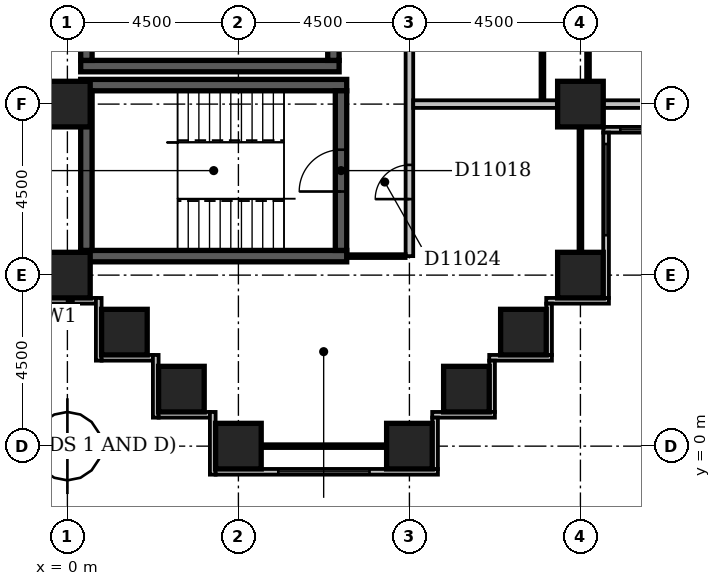
"""IFC4 building model, lengths in metres.
Left out: names, types, materials, properties, quantities, classifications, styles, units other than length and angle.
Written with IfcOpenShell. Run it as: python <this file> out.ifc"""

import sys

from ifc_helpers import new_model, si_unit, direction, frame, frame_2d, origin, origin_2d, place, context, subcontext, project, spatial, rectangle, extrude, element, fill, save


model = new_model("IFC4")
c1 = context("Model", 3, precision=1e-05, world=origin(), true_north=direction((0.0, 1.0)))
c2 = subcontext(c1, "Body", "Model", "MODEL_VIEW")
j1 = project(units=[si_unit("LENGTHUNIT", "METRE"), si_unit("PLANEANGLEUNIT", "RADIAN")], contexts=[c1])
p1 = place(None, origin())
s1 = spatial("IfcSite", under=j1, at=p1, CompositionType="ELEMENT")
p2 = place(p1, origin())
s2 = spatial("IfcBuilding", under=s1, at=p2, CompositionType="ELEMENT")
p3 = place(p2, frame((0.0, 0.0, 50.6)))
s3 = spatial("IfcBuildingStorey", under=s2, at=p3, CompositionType="ELEMENT", Elevation=50.6)
for number, where, z_axis, x_axis in (
    (1, (0.35, 5.0, -0.3), (0.0, 0.0, 1.0), (1.0, 0.0, 0.0)),
    (2, (0.35, 9.5, -0.3), (0.0, 0.0, 1.0), (1.0, 0.0, 0.0)),
):
    element("IfcWall", number, at=place(p3, frame(where, z_axis=z_axis, x_axis=x_axis)), inside=s3, PredefinedType="SHEAR", context=c2, shape_type="SweptSolid", body=[
        extrude(rectangle(XDim=7.0, YDim=0.3, at=frame_2d((3.5, 0.0))), origin(), (0.0, 0.0, 1.0), 3.6),
    ])
p4 = place(p3, frame((0.35, 10.0, -0.3), z_axis=(0.0, 0.0, 1.0), x_axis=(1.0, 0.0, 0.0)))
e3 = element("IfcWall", 3, at=p4, inside=s3, PredefinedType="SHEAR", context=c2, shape_type="SweptSolid", body=[
    extrude(rectangle(XDim=6.8, YDim=0.3, at=frame_2d((3.4, 0.0))), origin(), (0.0, 0.0, 1.0), 3.6),
])
p5 = place(p3, frame((0.5, 5.15, -0.3), z_axis=(0.0, 0.0, 1.0), x_axis=(0.0, 1.0, 0.0)))
e4 = element("IfcWall", 4, at=p5, inside=s3, PredefinedType="SHEAR", context=c2, shape_type="SweptSolid", body=[
    extrude(rectangle(XDim=4.2, YDim=0.3, at=frame_2d((2.1, 0.0))), origin(), (0.0, 0.0, 1.0), 3.6),
])
p6 = place(p3, frame((0.5, 10.15, -0.3), z_axis=(0.0, 0.0, 1.0), x_axis=(0.0, 1.0, 0.0)))
e5 = element("IfcWall", 5, at=p6, inside=s3, PredefinedType="SHEAR", context=c2, shape_type="SweptSolid", body=[
    extrude(rectangle(XDim=3.7, YDim=0.3, at=frame_2d((1.85, 0.0))), origin(), (0.0, 0.0, 1.0), 3.6),
])
p7 = place(p3, frame((7.0, 10.15, -0.3), z_axis=(0.0, 0.0, 1.0), x_axis=(0.0, 1.0, 0.0)))
e6 = element("IfcWall", 6, at=p7, inside=s3, PredefinedType="SHEAR", context=c2, shape_type="SweptSolid", body=[
    extrude(rectangle(XDim=3.7, YDim=0.3, at=frame_2d((1.85, 0.0))), origin(), (0.0, 0.0, 1.0), 3.6),
])
p8 = place(p7, frame((1.35, 0.0, 0.3)))
e7 = element("IfcOpeningElement", 7, at=p8, cuts=e6, PredefinedType="OPENING", context=c2, shape_type="SweptSolid", body=[
    extrude(rectangle(XDim=1.0, YDim=2.1, at=frame_2d((0.5, 1.05))), frame((0.0, 0.162, 0.0), z_axis=(0.0, -1.0, 0.0), x_axis=(1.0, 0.0, 0.0)), (0.0, 0.0, 1.0), 0.324),
])
p9 = place(p3, frame((7.2, 5.15, -0.3), z_axis=(0.0, 0.0, 1.0), x_axis=(0.0, 1.0, 0.0)))
e8 = element("IfcWall", 8, at=p9, inside=s3, PredefinedType="SHEAR", context=c2, shape_type="SweptSolid", body=[
    extrude(rectangle(XDim=4.2, YDim=0.3, at=frame_2d((2.1, 0.0))), origin(), (0.0, 0.0, 1.0), 3.6),
])
p10 = place(p9, frame((1.55, 0.0, 0.3)))
e9 = element("IfcOpeningElement", 9, at=p10, cuts=e8, PredefinedType="OPENING", context=c2, shape_type="SweptSolid", body=[
    extrude(rectangle(XDim=1.1, YDim=2.1, at=frame_2d((0.55, 1.05))), frame((0.0, 0.162, 0.0), z_axis=(0.0, -1.0, 0.0), x_axis=(1.0, 0.0, 0.0)), (0.0, 0.0, 1.0), 0.324),
])
for number, where, z_axis, x_axis in (
    (10, (4.5, 0.0, -0.3), (0.0, 0.0, 1.0), (1.0, 0.0, 0.0)),
    (11, (9.0, 0.0, -0.3), (0.0, 0.0, 1.0), (1.0, 0.0, 0.0)),
    (12, (3.0, 1.5, -0.3), (0.0, 0.0, 1.0), (1.0, 0.0, 0.0)),
    (13, (10.5, 1.5, -0.3), (0.0, 0.0, 1.0), (1.0, 0.0, 0.0)),
    (14, (1.5, 3.0, -0.3), (0.0, 0.0, 1.0), (1.0, 0.0, 0.0)),
    (15, (12.0, 3.0, -0.3), (0.0, 0.0, 1.0), (1.0, 0.0, 0.0)),
    (16, (0.0, 4.5, -0.3), (0.0, 0.0, 1.0), (1.0, 0.0, 0.0)),
    (17, (13.5, 4.5, -0.3), (0.0, 0.0, 1.0), (1.0, 0.0, 0.0)),
    (18, (0.0, 9.0, -0.3), (0.0, 0.0, 1.0), (1.0, 0.0, 0.0)),
    (19, (13.5, 9.0, -0.3), (0.0, 0.0, 1.0), (1.0, 0.0, 0.0)),
):
    element("IfcColumn", number, at=place(p3, frame(where, z_axis=z_axis, x_axis=x_axis)), inside=s3, PredefinedType="COLUMN", context=c2, shape_type="SweptSolid", body=[
        extrude(rectangle(XDim=1.2, YDim=1.2, at=origin_2d()), origin(), (0.0, 0.0, 1.0), 3.6),
    ])
p11 = place(p3, frame((9.675, -0.6, 0.0), z_axis=(0.0, 0.0, 1.0), x_axis=(0.0, 1.0, 0.0)))
e20 = element("IfcWall", 20, at=p11, inside=s3, PredefinedType="STANDARD", context=c2, shape_type="SweptSolid", body=[
    extrude(rectangle(XDim=1.35, YDim=0.15, at=frame_2d((0.675, 0.0))), origin(), (0.0, 0.0, 1.0), 2.7),
])
p12 = place(p3, frame((9.6, 0.825, 0.0), z_axis=(0.0, 0.0, 1.0), x_axis=(1.0, 0.0, 0.0)))
e21 = element("IfcWall", 21, at=p12, inside=s3, PredefinedType="STANDARD", context=c2, shape_type="SweptSolid", body=[
    extrude(rectangle(XDim=1.65, YDim=0.15, at=frame_2d((0.825, 0.0))), origin(), (0.0, 0.0, 1.0), 2.7),
])
p13 = place(p3, frame((11.175, 0.9, 0.0), z_axis=(0.0, 0.0, 1.0), x_axis=(0.0, 1.0, 0.0)))
e22 = element("IfcWall", 22, at=p13, inside=s3, PredefinedType="STANDARD", context=c2, shape_type="SweptSolid", body=[
    extrude(rectangle(XDim=1.35, YDim=0.15, at=frame_2d((0.675, 0.0))), origin(), (0.0, 0.0, 1.0), 2.7),
])
p14 = place(p3, frame((11.1, 2.325, 0.0), z_axis=(0.0, 0.0, 1.0), x_axis=(1.0, 0.0, 0.0)))
e23 = element("IfcWall", 23, at=p14, inside=s3, PredefinedType="STANDARD", context=c2, shape_type="SweptSolid", body=[
    extrude(rectangle(XDim=1.65, YDim=0.15, at=frame_2d((0.825, 0.0))), origin(), (0.0, 0.0, 1.0), 2.7),
])
p15 = place(p3, frame((12.675, 2.4, 0.0), z_axis=(0.0, 0.0, 1.0), x_axis=(0.0, 1.0, 0.0)))
e24 = element("IfcWall", 24, at=p15, inside=s3, PredefinedType="STANDARD", context=c2, shape_type="SweptSolid", body=[
    extrude(rectangle(XDim=1.35, YDim=0.15, at=frame_2d((0.675, 0.0))), origin(), (0.0, 0.0, 1.0), 2.7),
])
p16 = place(p3, frame((12.6, 3.825, 0.0), z_axis=(0.0, 0.0, 1.0), x_axis=(1.0, 0.0, 0.0)))
e25 = element("IfcWall", 25, at=p16, inside=s3, PredefinedType="STANDARD", context=c2, shape_type="SweptSolid", body=[
    extrude(rectangle(XDim=1.65, YDim=0.15, at=frame_2d((0.825, 0.0))), origin(), (0.0, 0.0, 1.0), 2.7),
])
p17 = place(p3, frame((14.175, 3.9, 0.0), z_axis=(0.0, 0.0, 1.0), x_axis=(0.0, 1.0, 0.0)))
e26 = element("IfcWall", 26, at=p17, inside=s3, PredefinedType="STANDARD", context=c2, shape_type="SweptSolid", body=[
    extrude(rectangle(XDim=4.35, YDim=0.15, at=frame_2d((2.175, 0.0))), origin(), (0.0, 0.0, 1.0), 2.7),
])
p18 = place(p17, frame((1.65, 0.0, 0.6)))
e27 = element("IfcOpeningElement", 27, at=p18, cuts=e26, PredefinedType="OPENING", context=c2, shape_type="SweptSolid", body=[
    extrude(rectangle(XDim=2.4, YDim=1.8, at=frame_2d((1.2, 0.9))), frame((0.0, 0.087, 0.0), z_axis=(0.0, -1.0, 0.0), x_axis=(1.0, 0.0, 0.0)), (0.0, 0.0, 1.0), 0.174),
])
p19 = place(p3, frame((14.1, 8.325, 0.0), z_axis=(0.0, 0.0, 1.0), x_axis=(1.0, 0.0, 0.0)))
e28 = element("IfcWall", 28, at=p19, inside=s3, PredefinedType="STANDARD", context=c2, shape_type="SweptSolid", body=[
    extrude(rectangle(XDim=4.65, YDim=0.15, at=frame_2d((2.325, 0.0))), origin(), (0.0, 0.0, 1.0), 2.7),
])
p20 = place(p19, frame((0.45, 0.0, 0.6)))
e29 = element("IfcOpeningElement", 29, at=p20, cuts=e28, PredefinedType="OPENING", context=c2, shape_type="SweptSolid", body=[
    extrude(rectangle(XDim=2.4, YDim=1.8, at=frame_2d((1.2, 0.9))), frame((0.0, 0.087, 0.0), z_axis=(0.0, -1.0, 0.0), x_axis=(1.0, 0.0, 0.0)), (0.0, 0.0, 1.0), 0.174),
])
p21 = place(p3, frame((-0.6, 3.825, 0.0), z_axis=(0.0, 0.0, 1.0), x_axis=(1.0, 0.0, 0.0)))
e30 = element("IfcWall", 30, at=p21, inside=s3, PredefinedType="STANDARD", context=c2, shape_type="SweptSolid", body=[
    extrude(rectangle(XDim=1.35, YDim=0.15, at=frame_2d((0.675, 0.0))), origin(), (0.0, 0.0, 1.0), 2.7),
])
p22 = place(p3, frame((0.825, 3.9, 0.0), z_axis=(0.0, 0.0, 1.0), x_axis=(0.0, -1.0, 0.0)))
e31 = element("IfcWall", 31, at=p22, inside=s3, PredefinedType="STANDARD", context=c2, shape_type="SweptSolid", body=[
    extrude(rectangle(XDim=1.65, YDim=0.15, at=frame_2d((0.825, 0.0))), origin(), (0.0, 0.0, 1.0), 2.7),
])
p23 = place(p3, frame((0.9, 2.325, 0.0), z_axis=(0.0, 0.0, 1.0), x_axis=(1.0, 0.0, 0.0)))
e32 = element("IfcWall", 32, at=p23, inside=s3, PredefinedType="STANDARD", context=c2, shape_type="SweptSolid", body=[
    extrude(rectangle(XDim=1.35, YDim=0.15, at=frame_2d((0.675, 0.0))), origin(), (0.0, 0.0, 1.0), 2.7),
])
p24 = place(p3, frame((2.325, 2.4, 0.0), z_axis=(0.0, 0.0, 1.0), x_axis=(0.0, -1.0, 0.0)))
e33 = element("IfcWall", 33, at=p24, inside=s3, PredefinedType="STANDARD", context=c2, shape_type="SweptSolid", body=[
    extrude(rectangle(XDim=1.65, YDim=0.15, at=frame_2d((0.825, 0.0))), origin(), (0.0, 0.0, 1.0), 2.7),
])
p25 = place(p3, frame((2.4, 0.825, 0.0), z_axis=(0.0, 0.0, 1.0), x_axis=(1.0, 0.0, 0.0)))
e34 = element("IfcWall", 34, at=p25, inside=s3, PredefinedType="STANDARD", context=c2, shape_type="SweptSolid", body=[
    extrude(rectangle(XDim=1.35, YDim=0.15, at=frame_2d((0.675, 0.0))), origin(), (0.0, 0.0, 1.0), 2.7),
])
p26 = place(p3, frame((3.825, 0.9, 0.0), z_axis=(0.0, 0.0, 1.0), x_axis=(0.0, -1.0, 0.0)))
e35 = element("IfcWall", 35, at=p26, inside=s3, PredefinedType="STANDARD", context=c2, shape_type="SweptSolid", body=[
    extrude(rectangle(XDim=1.65, YDim=0.15, at=frame_2d((0.825, 0.0))), origin(), (0.0, 0.0, 1.0), 2.7),
])
p27 = place(p3, frame((3.9, -0.675, 0.0), z_axis=(0.0, 0.0, 1.0), x_axis=(1.0, 0.0, 0.0)))
e36 = element("IfcWall", 36, at=p27, inside=s3, PredefinedType="STANDARD", context=c2, shape_type="SweptSolid", body=[
    extrude(rectangle(XDim=5.85, YDim=0.15, at=frame_2d((2.925, 0.0))), origin(), (0.0, 0.0, 1.0), 2.7),
])
p28 = place(p27, frame((1.65, 0.0, 0.6)))
e37 = element("IfcOpeningElement", 37, at=p28, cuts=e36, PredefinedType="OPENING", context=c2, shape_type="SweptSolid", body=[
    extrude(rectangle(XDim=2.4, YDim=1.8, at=frame_2d((1.2, 0.9))), frame((0.0, 0.087, 0.0), z_axis=(0.0, -1.0, 0.0), x_axis=(1.0, 0.0, 0.0)), (0.0, 0.0, 1.0), 0.174),
])
p29 = place(p3, frame((5.1, 0.0, 0.0), z_axis=(0.0, 0.0, 1.0), x_axis=(1.0, 0.0, 0.0)))
e38 = element("IfcWall", 38, at=p29, inside=s3, PredefinedType="PARTITIONING", context=c2, shape_type="SweptSolid", body=[
    extrude(rectangle(XDim=3.3, YDim=0.1, at=frame_2d((1.65, 0.0))), origin(), (0.0, 0.0, 1.0), 2.7),
])
p30 = place(p3, frame((0.0, 4.4, 0.0), z_axis=(0.0, 0.0, 1.0), x_axis=(0.0, 1.0, 0.0)))
e39 = element("IfcWall", 39, at=p30, inside=s3, PredefinedType="PARTITIONING", context=c2, shape_type="SweptSolid", body=[
    extrude(rectangle(XDim=0.7, YDim=0.1, at=frame_2d((0.35, 0.0))), origin(), (0.0, 0.0, 1.0), 2.7),
])
p31 = place(p3, frame((7.349, 5.0, 0.0), z_axis=(0.0, 0.0, 1.0), x_axis=(1.0, 0.0, 0.0)))
e40 = element("IfcWall", 40, at=p31, inside=s3, PredefinedType="PARTITIONING", context=c2, shape_type="SweptSolid", body=[
    extrude(rectangle(XDim=1.551, YDim=0.1, at=frame_2d((0.775, 0.0))), origin(), (0.0, 0.0, 1.0), 3.3),
])
p32 = place(p3, frame((9.0, 5.0, 0.0), z_axis=(0.0, 0.0, 1.0), x_axis=(0.0, 1.0, 0.0)))
e41 = element("IfcWall", 41, at=p32, inside=s3, PredefinedType="PARTITIONING", context=c2, shape_type="SweptSolid", body=[
    extrude(rectangle(XDim=44.5, YDim=0.2, at=frame_2d((22.25, 0.0))), origin(), (0.0, 0.0, 1.0), 3.3),
])
p33 = place(p32, frame((28.45, 0.0, 0.0)))
e42 = element("IfcOpeningElement", 42, at=p33, cuts=e41, PredefinedType="OPENING", context=c2, shape_type="SweptSolid", body=[
    extrude(rectangle(XDim=1.0, YDim=2.1, at=frame_2d((0.5, 1.05))), frame((0.0, 0.112, 0.0), z_axis=(0.0, -1.0, 0.0), x_axis=(1.0, 0.0, 0.0)), (0.0, 0.0, 1.0), 0.224),
])
p34 = place(p32, frame((17.8, 0.0, 0.0)))
e43 = element("IfcOpeningElement", 43, at=p34, cuts=e41, PredefinedType="OPENING", context=c2, shape_type="SweptSolid", body=[
    extrude(rectangle(XDim=1.0, YDim=2.1, at=frame_2d((0.5, 1.05))), frame((0.0, 0.112, 0.0), z_axis=(0.0, -1.0, 0.0), x_axis=(1.0, 0.0, 0.0)), (0.0, 0.0, 1.0), 0.224),
])
p35 = place(p32, frame((14.55, 0.0, 0.0)))
e44 = element("IfcOpeningElement", 44, at=p35, cuts=e41, PredefinedType="OPENING", context=c2, shape_type="SweptSolid", body=[
    extrude(rectangle(XDim=1.0, YDim=2.1, at=frame_2d((0.5, 1.05))), frame((0.0, 0.112, 0.0), z_axis=(0.0, -1.0, 0.0), x_axis=(1.0, 0.0, 0.0)), (0.0, 0.0, 1.0), 0.224),
])
p36 = place(p32, frame((11.7, 0.0, 0.0)))
e45 = element("IfcOpeningElement", 45, at=p36, cuts=e41, PredefinedType="OPENING", context=c2, shape_type="SweptSolid", body=[
    extrude(rectangle(XDim=1.0, YDim=2.1, at=frame_2d((0.5, 1.05))), frame((0.0, 0.112, 0.0), z_axis=(0.0, -1.0, 0.0), x_axis=(1.0, 0.0, 0.0)), (0.0, 0.0, 1.0), 0.224),
])
p37 = place(p32, frame((35.0, 0.0, 0.0)))
e46 = element("IfcOpeningElement", 46, at=p37, cuts=e41, PredefinedType="OPENING", context=c2, shape_type="SweptSolid", body=[
    extrude(rectangle(XDim=0.9, YDim=2.1, at=frame_2d((0.45, 1.05))), frame((0.0, 0.112, 0.0), z_axis=(0.0, -1.0, 0.0), x_axis=(1.0, 0.0, 0.0)), (0.0, 0.0, 1.0), 0.224),
])
p38 = place(p32, frame((1.5, 0.0, 0.0)))
e47 = element("IfcOpeningElement", 47, at=p38, cuts=e41, PredefinedType="OPENING", context=c2, shape_type="SweptSolid", body=[
    extrude(rectangle(XDim=0.9, YDim=2.1, at=frame_2d((0.45, 1.05))), frame((0.0, 0.112, 0.0), z_axis=(0.0, -1.0, 0.0), x_axis=(1.0, 0.0, 0.0)), (0.0, 0.0, 1.0), 0.224),
])
p39 = place(p3, frame((13.5, 5.1, 0.0), z_axis=(0.0, 0.0, 1.0), x_axis=(0.0, 1.0, 0.0)))
e48 = element("IfcWall", 48, at=p39, inside=s3, PredefinedType="PARTITIONING", context=c2, shape_type="SweptSolid", body=[
    extrude(rectangle(XDim=3.3, YDim=0.1, at=frame_2d((1.65, 0.0))), origin(), (0.0, 0.0, 1.0), 2.7),
])
p40 = place(p3, frame((9.1, 9.0, 0.0), z_axis=(0.0, 0.0, 1.0), x_axis=(1.0, 0.0, 0.0)))
e49 = element("IfcWall", 49, at=p40, inside=s3, PredefinedType="PARTITIONING", context=c2, shape_type="SweptSolid", body=[
    extrude(rectangle(XDim=3.8, YDim=0.2, at=frame_2d((1.9, 0.0))), origin(), (0.0, 0.0, 1.0), 3.3),
])
p41 = place(p3, frame((14.1, 9.0, 0.0), z_axis=(0.0, 0.0, 1.0), x_axis=(1.0, 0.0, 0.0)))
e50 = element("IfcWall", 50, at=p41, inside=s3, PredefinedType="PARTITIONING", context=c2, shape_type="SweptSolid", body=[
    extrude(rectangle(XDim=3.3, YDim=0.2, at=frame_2d((1.65, 0.0))), origin(), (0.0, 0.0, 1.0), 2.7),
])
p42 = place(p3, frame((12.5, 9.1, 0.0), z_axis=(0.0, 0.0, 1.0), x_axis=(0.0, 1.0, 0.0)))
e51 = element("IfcWall", 51, at=p42, inside=s3, PredefinedType="PARTITIONING", context=c2, shape_type="SweptSolid", body=[
    extrude(rectangle(XDim=7.3, YDim=0.1, at=frame_2d((3.65, 0.0))), origin(), (0.0, 0.0, 1.0), 3.3),
])
p43 = place(p42, frame((5.7, 0.0, 0.0)))
e52 = element("IfcOpeningElement", 52, at=p43, cuts=e51, PredefinedType="OPENING", context=c2, shape_type="SweptSolid", body=[
    extrude(rectangle(XDim=0.8, YDim=2.1, at=frame_2d((0.4, 1.05))), frame((0.0, 0.062, 0.0), z_axis=(0.0, -1.0, 0.0), x_axis=(1.0, 0.0, 0.0)), (0.0, 0.0, 1.0), 0.124),
])
p44 = place(p42, frame((1.95, 0.0, 0.0)))
e53 = element("IfcOpeningElement", 53, at=p44, cuts=e51, PredefinedType="OPENING", context=c2, shape_type="SweptSolid", body=[
    extrude(rectangle(XDim=0.9, YDim=2.1, at=frame_2d((0.45, 1.05))), frame((0.0, 0.062, 0.0), z_axis=(0.0, -1.0, 0.0), x_axis=(1.0, 0.0, 0.0)), (0.0, 0.0, 1.0), 0.124),
])
p45 = place(p3, frame((13.7, 9.6, 0.0), z_axis=(0.0, 0.0, 1.0), x_axis=(0.0, 1.0, 0.0)))
e54 = element("IfcWall", 54, at=p45, inside=s3, PredefinedType="PARTITIONING", context=c2, shape_type="SweptSolid", body=[
    extrude(rectangle(XDim=8.3, YDim=0.1, at=frame_2d((4.15, 0.0))), origin(), (0.0, 0.0, 1.0), 3.3),
])
p46 = place(p45, frame((1.2, 0.0, 0.0)))
e55 = element("IfcOpeningElement", 55, at=p46, cuts=e54, PredefinedType="OPENING", context=c2, shape_type="SweptSolid", body=[
    extrude(rectangle(XDim=0.9, YDim=2.1, at=frame_2d((0.45, 1.05))), frame((0.0, 0.062, 0.0), z_axis=(0.0, -1.0, 0.0), x_axis=(1.0, 0.0, 0.0)), (0.0, 0.0, 1.0), 0.124),
])
p47 = place(p45, frame((5.7, 0.0, 0.0)))
e56 = element("IfcOpeningElement", 56, at=p47, cuts=e54, PredefinedType="OPENING", context=c2, shape_type="SweptSolid", body=[
    extrude(rectangle(XDim=0.9, YDim=2.1, at=frame_2d((0.45, 1.05))), frame((0.0, 0.062, 0.0), z_axis=(0.0, -1.0, 0.0), x_axis=(1.0, 0.0, 0.0)), (0.0, 0.0, 1.0), 0.124),
])
p48 = place(p18, origin())
e57 = element("IfcWindow", 57, at=p48, inside=s3, PartitioningType="SINGLE_PANEL", PredefinedType="WINDOW", context=c2, shape_type="SweptSolid", body=[
    extrude(rectangle(XDim=2.4, YDim=1.8, at=frame_2d((1.2, 0.9))), frame((0.0, 0.03, 0.0), z_axis=(0.0, -1.0, 0.0), x_axis=(1.0, 0.0, 0.0)), (0.0, 0.0, 1.0), 0.06),
])
fill(e27, e57)
p49 = place(p20, origin())
e58 = element("IfcWindow", 58, at=p49, inside=s3, PartitioningType="SINGLE_PANEL", PredefinedType="WINDOW", context=c2, shape_type="SweptSolid", body=[
    extrude(rectangle(XDim=2.4, YDim=1.8, at=frame_2d((1.2, 0.9))), frame((0.0, 0.03, 0.0), z_axis=(0.0, -1.0, 0.0), x_axis=(1.0, 0.0, 0.0)), (0.0, 0.0, 1.0), 0.06),
])
fill(e29, e58)
p50 = place(p28, origin())
e59 = element("IfcWindow", 59, at=p50, inside=s3, PartitioningType="SINGLE_PANEL", PredefinedType="WINDOW", context=c2, shape_type="SweptSolid", body=[
    extrude(rectangle(XDim=2.4, YDim=1.8, at=frame_2d((1.2, 0.9))), frame((0.0, 0.03, 0.0), z_axis=(0.0, -1.0, 0.0), x_axis=(1.0, 0.0, 0.0)), (0.0, 0.0, 1.0), 0.06),
])
fill(e37, e59)
p51 = place(p10, origin())
e60 = element("IfcDoor", 60, at=p51, inside=s3, OperationType="SINGLE_SWING_LEFT", PredefinedType="DOOR", context=c2, shape_type="SweptSolid", body=[
    extrude(rectangle(XDim=1.1, YDim=2.1, at=frame_2d((0.55, 1.05))), frame((0.0, 0.025, 0.0), z_axis=(0.0, -1.0, 0.0), x_axis=(1.0, 0.0, 0.0)), (0.0, 0.0, 1.0), 0.05),
])
fill(e9, e60)
p52 = place(p38, origin())
e61 = element("IfcDoor", 61, at=p52, inside=s3, OperationType="SINGLE_SWING_LEFT", PredefinedType="DOOR", context=c2, shape_type="SweptSolid", body=[
    extrude(rectangle(XDim=0.9, YDim=2.1, at=frame_2d((0.45, 1.05))), frame((0.0, 0.025, 0.0), z_axis=(0.0, -1.0, 0.0), x_axis=(1.0, 0.0, 0.0)), (0.0, 0.0, 1.0), 0.05),
])
fill(e47, e61)
save(model, sys.argv[1])
